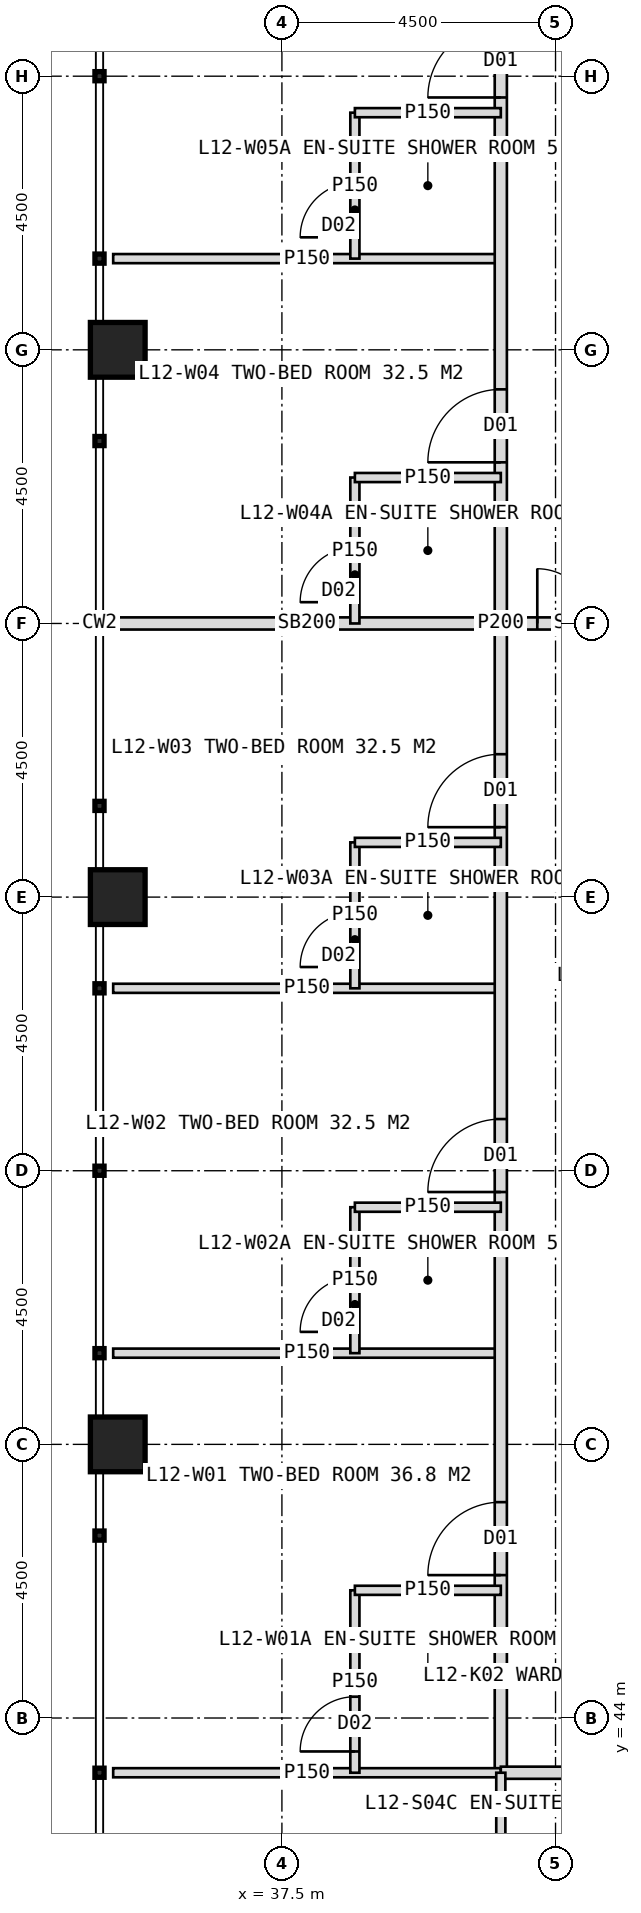
"""IFC4 building model, lengths in metres.
Left out: names, types, materials, properties, quantities, classifications, styles, units other than length and angle.
Written with IfcOpenShell. Run it as: python <this file> out.ifc"""

import sys

from ifc_helpers import new_model, si_unit, direction, frame, frame_2d, origin, origin_2d, place, context, subcontext, project, spatial, rectangle, hollow_rectangle, extrude, element, fill, save


model = new_model("IFC4")
c1 = context("Model", 3, precision=1e-05, world=origin(), true_north=direction((0.0, 1.0)))
c2 = subcontext(c1, "Body", "Model", "MODEL_VIEW")
j1 = project(units=[si_unit("LENGTHUNIT", "METRE"), si_unit("PLANEANGLEUNIT", "RADIAN")], contexts=[c1])
p1 = place(None, origin())
s1 = spatial("IfcSite", under=j1, at=p1, CompositionType="ELEMENT")
p2 = place(p1, origin())
s2 = spatial("IfcBuilding", under=s1, at=p2, CompositionType="ELEMENT")
p3 = place(p2, frame((0.0, 0.0, 55.0)))
s3 = spatial("IfcBuildingStorey", under=s2, at=p3, CompositionType="ELEMENT", Elevation=55.0)
for number, where, z_axis, x_axis in (
    (1, (34.8, 48.5, 0.0), (0.0, 0.0, 1.0), (1.0, 0.0, 0.0)),
    (2, (34.8, 57.5, 0.0), (0.0, 0.0, 1.0), (1.0, 0.0, 0.0)),
    (3, (34.8, 66.5, 0.0), (0.0, 0.0, 1.0), (1.0, 0.0, 0.0)),
):
    element("IfcColumn", number, at=place(p3, frame(where, z_axis=z_axis, x_axis=x_axis)), inside=s3, PredefinedType="COLUMN", context=c2, shape_type="SweptSolid", body=[
        extrude(hollow_rectangle(XDim=0.9, YDim=0.9, WallThickness=0.08, at=origin_2d()), origin(), (0.0, 0.0, 1.0), 4.0),
    ])
for number, where, z_axis, x_axis in (
    (4, (41.1, 50.0, 0.0), (0.0, 0.0, 1.0), (-1.0, 0.0, 0.0)),
    (5, (41.1, 56.0, 0.0), (0.0, 0.0, 1.0), (-1.0, 0.0, 0.0)),
):
    element("IfcWall", number, at=place(p3, frame(where, z_axis=z_axis, x_axis=x_axis)), inside=s3, PredefinedType="PARTITIONING", context=c2, shape_type="SweptSolid", body=[
        extrude(rectangle(XDim=6.375, YDim=0.15, at=frame_2d((3.188, 0.0))), origin(), (0.0, 0.0, 1.0), 3.75),
    ])
p4 = place(p3, frame((41.1, 62.0, 0.0), z_axis=(0.0, 0.0, 1.0), x_axis=(-1.0, 0.0, 0.0)))
e6 = element("IfcWall", 6, at=p4, inside=s3, PredefinedType="SOLIDWALL", context=c2, shape_type="SweptSolid", body=[
    extrude(rectangle(XDim=6.375, YDim=0.2, at=frame_2d((3.188, 0.0))), origin(), (0.0, 0.0, 1.0), 2.75),
])
p5 = place(p3, frame((41.1, 68.0, 0.0), z_axis=(0.0, 0.0, 1.0), x_axis=(-1.0, 0.0, 0.0)))
e7 = element("IfcWall", 7, at=p5, inside=s3, PredefinedType="PARTITIONING", context=c2, shape_type="SweptSolid", body=[
    extrude(rectangle(XDim=6.375, YDim=0.15, at=frame_2d((3.188, 0.0))), origin(), (0.0, 0.0, 1.0), 3.75),
])
p6 = place(p3, frame((41.1, 43.1, 0.0), z_axis=(0.0, 0.0, 1.0), x_axis=(0.0, 1.0, 0.0)))
e8 = element("IfcWall", 8, at=p6, inside=s3, PredefinedType="PARTITIONING", context=c2, shape_type="SweptSolid", body=[
    extrude(rectangle(XDim=37.8, YDim=0.2, at=frame_2d((18.9, 0.0))), origin(), (0.0, 0.0, 1.0), 3.75),
])
p7 = place(p6, frame((3.25, 0.0, 0.0)))
e9 = element("IfcOpeningElement", 9, at=p7, cuts=e8, PredefinedType="OPENING", context=c2, shape_type="SweptSolid", body=[
    extrude(rectangle(XDim=1.2, YDim=2.2, at=frame_2d((0.6, 1.1))), frame((0.0, 0.11, 0.0), z_axis=(0.0, -1.0, 0.0), x_axis=(1.0, 0.0, 0.0)), (0.0, 0.0, 1.0), 0.22),
])
p8 = place(p6, frame((9.55, 0.0, 0.0)))
e10 = element("IfcOpeningElement", 10, at=p8, cuts=e8, PredefinedType="OPENING", context=c2, shape_type="SweptSolid", body=[
    extrude(rectangle(XDim=1.2, YDim=2.2, at=frame_2d((0.6, 1.1))), frame((0.0, 0.11, 0.0), z_axis=(0.0, -1.0, 0.0), x_axis=(1.0, 0.0, 0.0)), (0.0, 0.0, 1.0), 0.22),
])
p9 = place(p6, frame((15.55, 0.0, 0.0)))
e11 = element("IfcOpeningElement", 11, at=p9, cuts=e8, PredefinedType="OPENING", context=c2, shape_type="SweptSolid", body=[
    extrude(rectangle(XDim=1.2, YDim=2.2, at=frame_2d((0.6, 1.1))), frame((0.0, 0.11, 0.0), z_axis=(0.0, -1.0, 0.0), x_axis=(1.0, 0.0, 0.0)), (0.0, 0.0, 1.0), 0.22),
])
p10 = place(p6, frame((21.55, 0.0, 0.0)))
e12 = element("IfcOpeningElement", 12, at=p10, cuts=e8, PredefinedType="OPENING", context=c2, shape_type="SweptSolid", body=[
    extrude(rectangle(XDim=1.2, YDim=2.2, at=frame_2d((0.6, 1.1))), frame((0.0, 0.11, 0.0), z_axis=(0.0, -1.0, 0.0), x_axis=(1.0, 0.0, 0.0)), (0.0, 0.0, 1.0), 0.22),
])
p11 = place(p6, frame((27.55, 0.0, 0.0)))
e13 = element("IfcOpeningElement", 13, at=p11, cuts=e8, PredefinedType="OPENING", context=c2, shape_type="SweptSolid", body=[
    extrude(rectangle(XDim=1.2, YDim=2.2, at=frame_2d((0.6, 1.1))), frame((0.0, 0.11, 0.0), z_axis=(0.0, -1.0, 0.0), x_axis=(1.0, 0.0, 0.0)), (0.0, 0.0, 1.0), 0.22),
])
p12 = place(p3, frame((41.1, 43.1, 0.0), z_axis=(0.0, 0.0, 1.0), x_axis=(-1.0, 0.0, 0.0)))
e14 = element("IfcWall", 14, at=p12, inside=s3, PredefinedType="PARTITIONING", context=c2, shape_type="SweptSolid", body=[
    extrude(rectangle(XDim=6.375, YDim=0.15, at=frame_2d((3.188, 0.0))), origin(), (0.0, 0.0, 1.0), 3.75),
])
p13 = place(p3, frame((38.7, 43.1, 0.0), z_axis=(0.0, 0.0, 1.0), x_axis=(0.0, 1.0, 0.0)))
e15 = element("IfcWall", 15, at=p13, inside=s3, PredefinedType="PARTITIONING", context=c2, shape_type="SweptSolid", body=[
    extrude(rectangle(XDim=3.0, YDim=0.15, at=frame_2d((1.5, 0.0))), origin(), (0.0, 0.0, 1.0), 3.75),
])
p14 = place(p13, frame((0.35, 0.0, 0.0)))
e16 = element("IfcOpeningElement", 16, at=p14, cuts=e15, PredefinedType="OPENING", context=c2, shape_type="SweptSolid", body=[
    extrude(rectangle(XDim=0.9, YDim=2.1, at=frame_2d((0.45, 1.05))), frame((0.0, 0.085, 0.0), z_axis=(0.0, -1.0, 0.0), x_axis=(1.0, 0.0, 0.0)), (0.0, 0.0, 1.0), 0.17),
])
p15 = place(p3, frame((41.1, 46.1, 0.0), z_axis=(0.0, 0.0, 1.0), x_axis=(-1.0, 0.0, 0.0)))
e17 = element("IfcWall", 17, at=p15, inside=s3, PredefinedType="PARTITIONING", context=c2, shape_type="SweptSolid", body=[
    extrude(rectangle(XDim=2.4, YDim=0.15, at=frame_2d((1.2, 0.0))), origin(), (0.0, 0.0, 1.0), 3.75),
])
p16 = place(p3, frame((38.7, 50.0, 0.0), z_axis=(0.0, 0.0, 1.0), x_axis=(0.0, 1.0, 0.0)))
e18 = element("IfcWall", 18, at=p16, inside=s3, PredefinedType="PARTITIONING", context=c2, shape_type="SweptSolid", body=[
    extrude(rectangle(XDim=2.4, YDim=0.15, at=frame_2d((1.2, 0.0))), origin(), (0.0, 0.0, 1.0), 3.75),
])
p17 = place(p16, frame((0.35, 0.0, 0.0)))
e19 = element("IfcOpeningElement", 19, at=p17, cuts=e18, PredefinedType="OPENING", context=c2, shape_type="SweptSolid", body=[
    extrude(rectangle(XDim=0.9, YDim=2.1, at=frame_2d((0.45, 1.05))), frame((0.0, 0.085, 0.0), z_axis=(0.0, -1.0, 0.0), x_axis=(1.0, 0.0, 0.0)), (0.0, 0.0, 1.0), 0.17),
])
p18 = place(p3, frame((41.1, 52.4, 0.0), z_axis=(0.0, 0.0, 1.0), x_axis=(-1.0, 0.0, 0.0)))
e20 = element("IfcWall", 20, at=p18, inside=s3, PredefinedType="PARTITIONING", context=c2, shape_type="SweptSolid", body=[
    extrude(rectangle(XDim=2.4, YDim=0.15, at=frame_2d((1.2, 0.0))), origin(), (0.0, 0.0, 1.0), 3.75),
])
p19 = place(p3, frame((38.7, 56.0, 0.0), z_axis=(0.0, 0.0, 1.0), x_axis=(0.0, 1.0, 0.0)))
e21 = element("IfcWall", 21, at=p19, inside=s3, PredefinedType="PARTITIONING", context=c2, shape_type="SweptSolid", body=[
    extrude(rectangle(XDim=2.4, YDim=0.15, at=frame_2d((1.2, 0.0))), origin(), (0.0, 0.0, 1.0), 3.75),
])
p20 = place(p19, frame((0.35, 0.0, 0.0)))
e22 = element("IfcOpeningElement", 22, at=p20, cuts=e21, PredefinedType="OPENING", context=c2, shape_type="SweptSolid", body=[
    extrude(rectangle(XDim=0.9, YDim=2.1, at=frame_2d((0.45, 1.05))), frame((0.0, 0.085, 0.0), z_axis=(0.0, -1.0, 0.0), x_axis=(1.0, 0.0, 0.0)), (0.0, 0.0, 1.0), 0.17),
])
p21 = place(p3, frame((41.1, 58.4, 0.0), z_axis=(0.0, 0.0, 1.0), x_axis=(-1.0, 0.0, 0.0)))
e23 = element("IfcWall", 23, at=p21, inside=s3, PredefinedType="PARTITIONING", context=c2, shape_type="SweptSolid", body=[
    extrude(rectangle(XDim=2.4, YDim=0.15, at=frame_2d((1.2, 0.0))), origin(), (0.0, 0.0, 1.0), 3.75),
])
p22 = place(p3, frame((38.7, 62.0, 0.0), z_axis=(0.0, 0.0, 1.0), x_axis=(0.0, 1.0, 0.0)))
e24 = element("IfcWall", 24, at=p22, inside=s3, PredefinedType="PARTITIONING", context=c2, shape_type="SweptSolid", body=[
    extrude(rectangle(XDim=2.4, YDim=0.15, at=frame_2d((1.2, 0.0))), origin(), (0.0, 0.0, 1.0), 3.75),
])
p23 = place(p22, frame((0.35, 0.0, 0.0)))
e25 = element("IfcOpeningElement", 25, at=p23, cuts=e24, PredefinedType="OPENING", context=c2, shape_type="SweptSolid", body=[
    extrude(rectangle(XDim=0.9, YDim=2.1, at=frame_2d((0.45, 1.05))), frame((0.0, 0.085, 0.0), z_axis=(0.0, -1.0, 0.0), x_axis=(1.0, 0.0, 0.0)), (0.0, 0.0, 1.0), 0.17),
])
p24 = place(p3, frame((41.1, 64.4, 0.0), z_axis=(0.0, 0.0, 1.0), x_axis=(-1.0, 0.0, 0.0)))
e26 = element("IfcWall", 26, at=p24, inside=s3, PredefinedType="PARTITIONING", context=c2, shape_type="SweptSolid", body=[
    extrude(rectangle(XDim=2.4, YDim=0.15, at=frame_2d((1.2, 0.0))), origin(), (0.0, 0.0, 1.0), 3.75),
])
p25 = place(p3, frame((38.7, 68.0, 0.0), z_axis=(0.0, 0.0, 1.0), x_axis=(0.0, 1.0, 0.0)))
e27 = element("IfcWall", 27, at=p25, inside=s3, PredefinedType="PARTITIONING", context=c2, shape_type="SweptSolid", body=[
    extrude(rectangle(XDim=2.4, YDim=0.15, at=frame_2d((1.2, 0.0))), origin(), (0.0, 0.0, 1.0), 3.75),
])
p26 = place(p25, frame((0.35, 0.0, 0.0)))
e28 = element("IfcOpeningElement", 28, at=p26, cuts=e27, PredefinedType="OPENING", context=c2, shape_type="SweptSolid", body=[
    extrude(rectangle(XDim=0.9, YDim=2.1, at=frame_2d((0.45, 1.05))), frame((0.0, 0.085, 0.0), z_axis=(0.0, -1.0, 0.0), x_axis=(1.0, 0.0, 0.0)), (0.0, 0.0, 1.0), 0.17),
])
p27 = place(p3, frame((41.1, 70.4, 0.0), z_axis=(0.0, 0.0, 1.0), x_axis=(-1.0, 0.0, 0.0)))
e29 = element("IfcWall", 29, at=p27, inside=s3, PredefinedType="PARTITIONING", context=c2, shape_type="SweptSolid", body=[
    extrude(rectangle(XDim=2.4, YDim=0.15, at=frame_2d((1.2, 0.0))), origin(), (0.0, 0.0, 1.0), 3.75),
])
p28 = place(p3, frame((78.9, 43.1, 0.0), z_axis=(0.0, 0.0, 1.0), x_axis=(-1.0, 0.0, 0.0)))
e30 = element("IfcWall", 30, at=p28, inside=s3, PredefinedType="PARTITIONING", context=c2, shape_type="SweptSolid", body=[
    extrude(rectangle(XDim=37.8, YDim=0.2, at=frame_2d((18.9, 0.0))), origin(), (0.0, 0.0, 1.0), 3.75),
])
p29 = place(p28, frame((2.65, 0.0, 0.0)))
e31 = element("IfcOpeningElement", 31, at=p29, cuts=e30, PredefinedType="OPENING", context=c2, shape_type="SweptSolid", body=[
    extrude(rectangle(XDim=1.2, YDim=2.2, at=frame_2d((0.6, 1.1))), frame((0.0, 0.11, 0.0), z_axis=(0.0, -1.0, 0.0), x_axis=(1.0, 0.0, 0.0)), (0.0, 0.0, 1.0), 0.22),
])
p30 = place(p28, frame((12.55, 0.0, 0.0)))
e32 = element("IfcOpeningElement", 32, at=p30, cuts=e30, PredefinedType="OPENING", context=c2, shape_type="SweptSolid", body=[
    extrude(rectangle(XDim=1.2, YDim=2.2, at=frame_2d((0.6, 1.1))), frame((0.0, 0.11, 0.0), z_axis=(0.0, -1.0, 0.0), x_axis=(1.0, 0.0, 0.0)), (0.0, 0.0, 1.0), 0.22),
])
p31 = place(p28, frame((21.55, 0.0, 0.0)))
e33 = element("IfcOpeningElement", 33, at=p31, cuts=e30, PredefinedType="OPENING", context=c2, shape_type="SweptSolid", body=[
    extrude(rectangle(XDim=1.2, YDim=2.2, at=frame_2d((0.6, 1.1))), frame((0.0, 0.11, 0.0), z_axis=(0.0, -1.0, 0.0), x_axis=(1.0, 0.0, 0.0)), (0.0, 0.0, 1.0), 0.22),
])
p32 = place(p28, frame((30.55, 0.0, 0.0)))
e34 = element("IfcOpeningElement", 34, at=p32, cuts=e30, PredefinedType="OPENING", context=c2, shape_type="SweptSolid", body=[
    extrude(rectangle(XDim=1.2, YDim=2.2, at=frame_2d((0.6, 1.1))), frame((0.0, 0.11, 0.0), z_axis=(0.0, -1.0, 0.0), x_axis=(1.0, 0.0, 0.0)), (0.0, 0.0, 1.0), 0.22),
])
p33 = place(p3, frame((41.1, 43.1, 0.0), z_axis=(0.0, 0.0, 1.0), x_axis=(0.0, -1.0, 0.0)))
e35 = element("IfcWall", 35, at=p33, inside=s3, PredefinedType="PARTITIONING", context=c2, shape_type="SweptSolid", body=[
    extrude(rectangle(XDim=2.4, YDim=0.15, at=frame_2d((1.2, 0.0))), origin(), (0.0, 0.0, 1.0), 3.75),
])
p34 = place(p3, frame((43.8, 62.0, 0.0), z_axis=(0.0, 0.0, 1.0), x_axis=(-1.0, 0.0, 0.0)))
e36 = element("IfcWall", 36, at=p34, inside=s3, PredefinedType="SOLIDWALL", context=c2, shape_type="SweptSolid", body=[
    extrude(rectangle(XDim=2.7, YDim=0.2, at=frame_2d((1.35, 0.0))), origin(), (0.0, 0.0, 1.0), 2.75),
])
p35 = place(p34, frame((0.3, 0.0, 0.0)))
e37 = element("IfcOpeningElement", 37, at=p35, cuts=e36, PredefinedType="OPENING", context=c2, shape_type="SweptSolid", body=[
    extrude(rectangle(XDim=1.8, YDim=2.2, at=frame_2d((0.9, 1.1))), frame((0.0, 0.11, 0.0), z_axis=(0.0, -1.0, 0.0), x_axis=(1.0, 0.0, 0.0)), (0.0, 0.0, 1.0), 0.22),
])
p36 = place(p7, origin())
e38 = element("IfcDoor", 38, at=p36, inside=s3, OperationType="SINGLE_SWING_LEFT", PredefinedType="DOOR", context=c2, shape_type="SweptSolid", body=[
    extrude(rectangle(XDim=1.2, YDim=2.2, at=frame_2d((0.6, 1.1))), frame((0.0, 0.025, 0.0), z_axis=(0.0, -1.0, 0.0), x_axis=(1.0, 0.0, 0.0)), (0.0, 0.0, 1.0), 0.05),
])
fill(e9, e38)
p37 = place(p14, origin())
e39 = element("IfcDoor", 39, at=p37, inside=s3, OperationType="SINGLE_SWING_LEFT", PredefinedType="DOOR", context=c2, shape_type="SweptSolid", body=[
    extrude(rectangle(XDim=0.9, YDim=2.1, at=frame_2d((0.45, 1.05))), frame((0.0, 0.025, 0.0), z_axis=(0.0, -1.0, 0.0), x_axis=(1.0, 0.0, 0.0)), (0.0, 0.0, 1.0), 0.05),
])
fill(e16, e39)
p38 = place(p8, origin())
e40 = element("IfcDoor", 40, at=p38, inside=s3, OperationType="SINGLE_SWING_LEFT", PredefinedType="DOOR", context=c2, shape_type="SweptSolid", body=[
    extrude(rectangle(XDim=1.2, YDim=2.2, at=frame_2d((0.6, 1.1))), frame((0.0, 0.025, 0.0), z_axis=(0.0, -1.0, 0.0), x_axis=(1.0, 0.0, 0.0)), (0.0, 0.0, 1.0), 0.05),
])
fill(e10, e40)
p39 = place(p17, origin())
e41 = element("IfcDoor", 41, at=p39, inside=s3, OperationType="SINGLE_SWING_LEFT", PredefinedType="DOOR", context=c2, shape_type="SweptSolid", body=[
    extrude(rectangle(XDim=0.9, YDim=2.1, at=frame_2d((0.45, 1.05))), frame((0.0, 0.025, 0.0), z_axis=(0.0, -1.0, 0.0), x_axis=(1.0, 0.0, 0.0)), (0.0, 0.0, 1.0), 0.05),
])
fill(e19, e41)
p40 = place(p9, origin())
e42 = element("IfcDoor", 42, at=p40, inside=s3, OperationType="SINGLE_SWING_LEFT", PredefinedType="DOOR", context=c2, shape_type="SweptSolid", body=[
    extrude(rectangle(XDim=1.2, YDim=2.2, at=frame_2d((0.6, 1.1))), frame((0.0, 0.025, 0.0), z_axis=(0.0, -1.0, 0.0), x_axis=(1.0, 0.0, 0.0)), (0.0, 0.0, 1.0), 0.05),
])
fill(e11, e42)
p41 = place(p20, origin())
e43 = element("IfcDoor", 43, at=p41, inside=s3, OperationType="SINGLE_SWING_LEFT", PredefinedType="DOOR", context=c2, shape_type="SweptSolid", body=[
    extrude(rectangle(XDim=0.9, YDim=2.1, at=frame_2d((0.45, 1.05))), frame((0.0, 0.025, 0.0), z_axis=(0.0, -1.0, 0.0), x_axis=(1.0, 0.0, 0.0)), (0.0, 0.0, 1.0), 0.05),
])
fill(e22, e43)
p42 = place(p10, origin())
e44 = element("IfcDoor", 44, at=p42, inside=s3, OperationType="SINGLE_SWING_LEFT", PredefinedType="DOOR", context=c2, shape_type="SweptSolid", body=[
    extrude(rectangle(XDim=1.2, YDim=2.2, at=frame_2d((0.6, 1.1))), frame((0.0, 0.025, 0.0), z_axis=(0.0, -1.0, 0.0), x_axis=(1.0, 0.0, 0.0)), (0.0, 0.0, 1.0), 0.05),
])
fill(e12, e44)
p43 = place(p23, origin())
e45 = element("IfcDoor", 45, at=p43, inside=s3, OperationType="SINGLE_SWING_LEFT", PredefinedType="DOOR", context=c2, shape_type="SweptSolid", body=[
    extrude(rectangle(XDim=0.9, YDim=2.1, at=frame_2d((0.45, 1.05))), frame((0.0, 0.025, 0.0), z_axis=(0.0, -1.0, 0.0), x_axis=(1.0, 0.0, 0.0)), (0.0, 0.0, 1.0), 0.05),
])
fill(e25, e45)
p44 = place(p11, origin())
e46 = element("IfcDoor", 46, at=p44, inside=s3, OperationType="SINGLE_SWING_LEFT", PredefinedType="DOOR", context=c2, shape_type="SweptSolid", body=[
    extrude(rectangle(XDim=1.2, YDim=2.2, at=frame_2d((0.6, 1.1))), frame((0.0, 0.025, 0.0), z_axis=(0.0, -1.0, 0.0), x_axis=(1.0, 0.0, 0.0)), (0.0, 0.0, 1.0), 0.05),
])
fill(e13, e46)
p45 = place(p26, origin())
e47 = element("IfcDoor", 47, at=p45, inside=s3, OperationType="SINGLE_SWING_LEFT", PredefinedType="DOOR", context=c2, shape_type="SweptSolid", body=[
    extrude(rectangle(XDim=0.9, YDim=2.1, at=frame_2d((0.45, 1.05))), frame((0.0, 0.025, 0.0), z_axis=(0.0, -1.0, 0.0), x_axis=(1.0, 0.0, 0.0)), (0.0, 0.0, 1.0), 0.05),
])
fill(e28, e47)
p46 = place(p35, origin())
e48 = element("IfcDoor", 48, at=p46, inside=s3, OperationType="DOUBLE_DOOR_DOUBLE_SWING", PredefinedType="DOOR", context=c2, shape_type="SweptSolid", body=[
    extrude(rectangle(XDim=1.8, YDim=2.2, at=frame_2d((0.9, 1.1))), frame((0.0, 0.025, 0.0), z_axis=(0.0, -1.0, 0.0), x_axis=(1.0, 0.0, 0.0)), (0.0, 0.0, 1.0), 0.05),
])
fill(e37, e48)
save(model, sys.argv[1])
